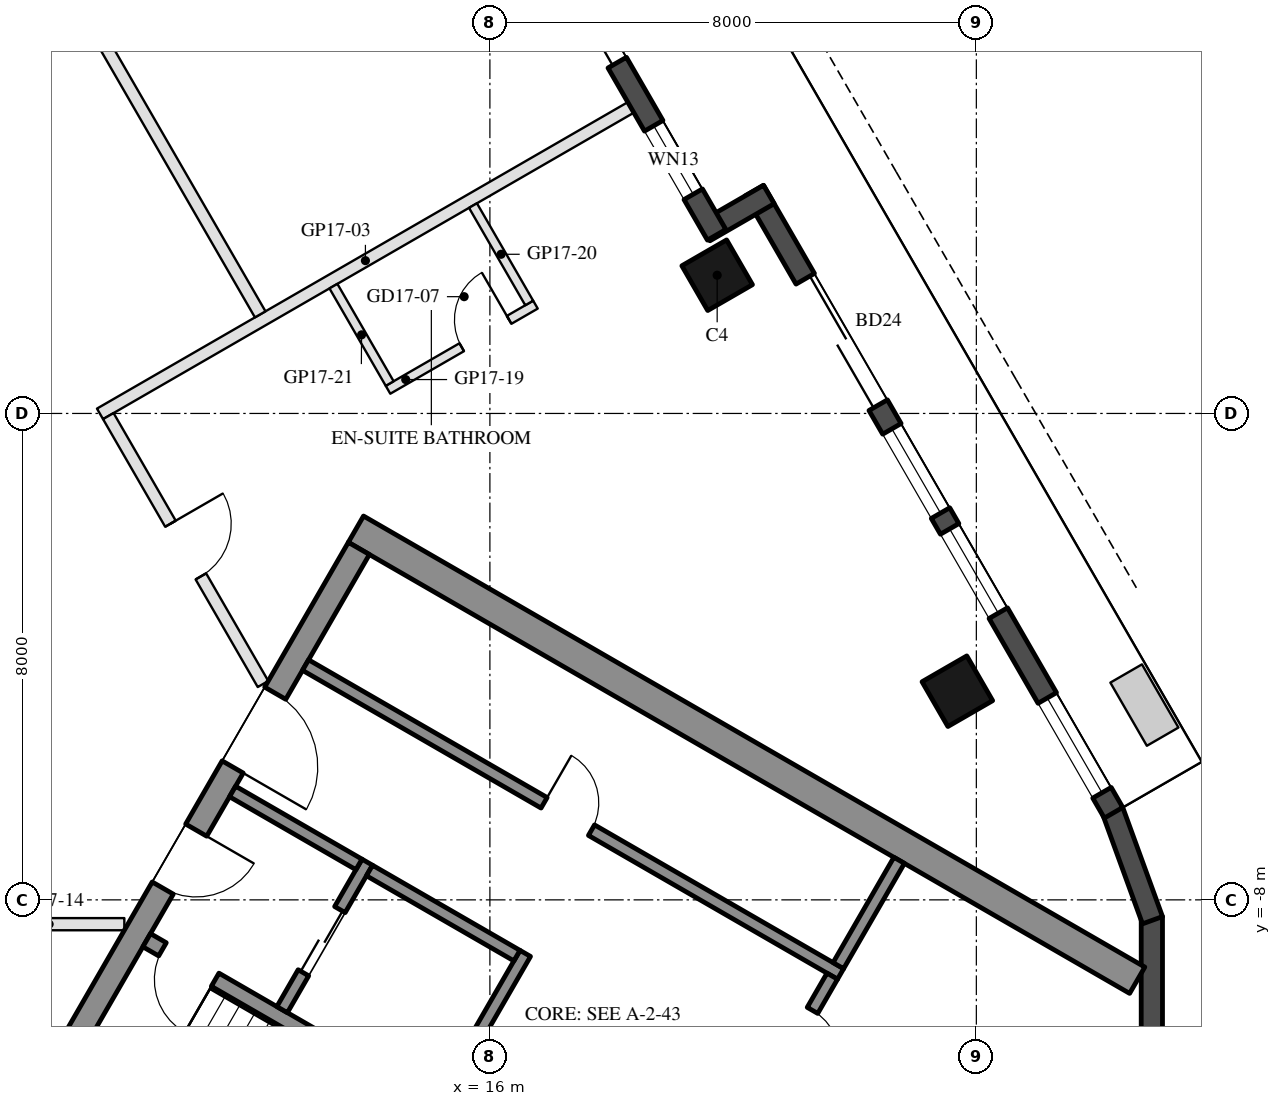
"""IFC4 building model, lengths in metres.
Left out: names, types, materials, properties, quantities, classifications, styles, units other than length and angle.
Written with IfcOpenShell. Run it as: python <this file> out.ifc"""

import sys

from ifc_helpers import new_model, si_unit, direction, frame, frame_2d, origin, origin_2d, place, context, subcontext, project, spatial, rectangle, hollow_rectangle, extrude, element, fill, save


model = new_model("IFC4")
c1 = context("Model", 3, precision=1e-05, world=origin(), true_north=direction((0.0, 1.0)))
c2 = subcontext(c1, "Body", "Model", "MODEL_VIEW")
j1 = project(units=[si_unit("LENGTHUNIT", "METRE"), si_unit("PLANEANGLEUNIT", "RADIAN")], contexts=[c1])
p1 = place(None, origin())
s1 = spatial("IfcSite", under=j1, at=p1, CompositionType="ELEMENT")
p2 = place(p1, origin())
s2 = spatial("IfcBuilding", under=s1, at=p2, CompositionType="ELEMENT")
p3 = place(p2, frame((0.0, 0.0, 183.6)))
s3 = spatial("IfcBuildingStorey", under=s2, at=p3, CompositionType="ELEMENT", Elevation=183.6)
for number, where, z_axis, x_axis in (
    (1, (23.688, -4.568, 0.0), (0.0, 0.0, 1.0), (-0.5, 0.866, 0.0)),
    (2, (19.738, 2.273, 0.0), (0.0, 0.0, 1.0), (-0.5, 0.866, 0.0)),
):
    element("IfcColumn", number, at=place(p3, frame(where, z_axis=z_axis, x_axis=x_axis)), inside=s3, PredefinedType="COLUMN", context=c2, shape_type="SweptSolid", body=[
        extrude(hollow_rectangle(XDim=0.85, YDim=0.85, WallThickness=0.04, at=origin_2d()), origin(), (0.0, 0.0, 1.0), 3.7),
    ])
for number, where, z_axis, x_axis in (
    (3, (26.244, -11.92, 0.0), (0.0, 0.0, 1.0), (0.342, 0.94, 0.0)),
    (4, (26.886, -10.185, 0.0), (0.0, 0.0, 1.0), (0.0, 1.0, 0.0)),
    (5, (26.897, -8.335, 0.0), (0.0, 0.0, 1.0), (-0.342, 0.94, 0.0)),
):
    element("IfcWall", number, at=place(p3, frame(where, z_axis=z_axis, x_axis=x_axis)), inside=s3, PredefinedType="SOLIDWALL", context=c2, shape_type="SweptSolid", body=[
        extrude(rectangle(XDim=1.91, YDim=0.35, at=frame_2d((0.955, 0.0))), origin(), (0.0, 0.0, 1.0), 3.55),
    ])
p4 = place(p3, frame((26.257, -6.567, 0.0), z_axis=(0.0, 0.0, 1.0), x_axis=(-0.500023526245, 0.866011820475, 0.0)))
e6 = element("IfcWall", 6, at=p4, inside=s3, PredefinedType="SOLIDWALL", context=c2, shape_type="SweptSolid", body=[
    extrude(rectangle(XDim=11.816, YDim=0.35, at=frame_2d((5.908, 0.0))), origin(), (0.0, 0.0, 1.0), 3.55),
])
p5 = place(p4, frame((0.38, 0.0, 0.3)))
e7 = element("IfcOpeningElement", 7, at=p5, cuts=e6, PredefinedType="OPENING", context=c2, shape_type="SweptSolid", body=[
    extrude(rectangle(XDim=1.8, YDim=2.65, at=frame_2d((0.9, 1.325))), frame((0.0, 0.185, 0.0), z_axis=(0.0, -1.0, 0.0), x_axis=(1.0, 0.0, 0.0)), (0.0, 0.0, 1.0), 0.37),
])
p6 = place(p4, frame((7.741, 0.0, 0.0)))
e8 = element("IfcOpeningElement", 8, at=p6, cuts=e6, PredefinedType="OPENING", context=c2, shape_type="SweptSolid", body=[
    extrude(rectangle(XDim=2.4, YDim=2.4, at=frame_2d((1.2, 1.2))), frame((0.0, 0.185, 0.0), z_axis=(0.0, -1.0, 0.0), x_axis=(1.0, 0.0, 0.0)), (0.0, 0.0, 1.0), 0.37),
])
p7 = place(p4, frame((3.791, 0.0, 0.3)))
e9 = element("IfcOpeningElement", 9, at=p7, cuts=e6, PredefinedType="OPENING", context=c2, shape_type="SweptSolid", body=[
    extrude(rectangle(XDim=1.6, YDim=2.65, at=frame_2d((0.8, 1.325))), frame((0.0, 0.185, 0.0), z_axis=(0.0, -1.0, 0.0), x_axis=(1.0, 0.0, 0.0)), (0.0, 0.0, 1.0), 0.37),
])
p8 = place(p4, frame((5.691, 0.0, 0.3)))
e10 = element("IfcOpeningElement", 10, at=p8, cuts=e6, PredefinedType="OPENING", context=c2, shape_type="SweptSolid", body=[
    extrude(rectangle(XDim=1.6, YDim=2.65, at=frame_2d((0.8, 1.325))), frame((0.0, 0.185, 0.0), z_axis=(0.0, -1.0, 0.0), x_axis=(1.0, 0.0, 0.0)), (0.0, 0.0, 1.0), 0.37),
])
p9 = place(p3, frame((20.588, 3.601, 0.0), z_axis=(0.0, 0.0, 1.0), x_axis=(-0.866005645448, -0.500034220881, 0.0)))
e11 = element("IfcWall", 11, at=p9, inside=s3, PredefinedType="SOLIDWALL", context=c2, shape_type="SweptSolid", body=[
    extrude(rectangle(XDim=1.22, YDim=0.35, at=frame_2d((0.61, 0.0))), origin(), (0.0, 0.0, 1.0), 3.55),
])
p10 = place(p3, frame((19.729, 2.938, 0.0), z_axis=(0.0, 0.0, 1.0), x_axis=(-0.499976430342, 0.866039011305, 0.0)))
e12 = element("IfcWall", 12, at=p10, inside=s3, PredefinedType="SOLIDWALL", context=c2, shape_type="SweptSolid", body=[
    extrude(rectangle(XDim=6.74, YDim=0.35, at=frame_2d((3.37, 0.0))), origin(), (0.0, 0.0, 1.0), 3.55),
])
p11 = place(p10, frame((0.77, 0.0, 0.3)))
e13 = element("IfcOpeningElement", 13, at=p11, cuts=e12, PredefinedType="OPENING", context=c2, shape_type="SweptSolid", body=[
    extrude(rectangle(XDim=1.3, YDim=2.65, at=frame_2d((0.65, 1.325))), frame((0.0, 0.185, 0.0), z_axis=(0.0, -1.0, 0.0), x_axis=(1.0, 0.0, 0.0)), (0.0, 0.0, 1.0), 0.37),
])
p12 = place(p10, frame((3.27, 0.0, 0.0)))
e14 = element("IfcOpeningElement", 14, at=p12, cuts=e12, PredefinedType="OPENING", context=c2, shape_type="SweptSolid", body=[
    extrude(rectangle(XDim=2.4, YDim=2.4, at=frame_2d((1.2, 1.2))), frame((0.0, 0.185, 0.0), z_axis=(0.0, -1.0, 0.0), x_axis=(1.0, 0.0, 0.0)), (0.0, 0.0, 1.0), 0.37),
])
p13 = place(p3, frame((13.797, -1.903, 0.0), z_axis=(0.0, 0.0, 1.0), x_axis=(0.866025009528, -0.500000682871, 0.0)))
e15 = element("IfcWall", 15, at=p13, inside=s3, PredefinedType="SHEAR", context=c2, shape_type="SweptSolid", body=[
    extrude(rectangle(XDim=14.837, YDim=0.5, at=frame_2d((7.418, 0.0))), origin(), (0.0, 0.0, 1.0), 3.5),
])
p14 = place(p3, frame((8.845, -10.88, 0.0), z_axis=(0.0, 0.0, 1.0), x_axis=(0.500004234368, 0.866022959057, 0.0)))
e16 = element("IfcWall", 16, at=p14, inside=s3, PredefinedType="SHEAR", context=c2, shape_type="SweptSolid", body=[
    extrude(rectangle(XDim=10.0, YDim=0.4, at=frame_2d((5.0, 0.0))), origin(), (0.0, 0.0, 1.0), 3.5),
])
p15 = place(p14, frame((3.55, 0.0, 0.0)))
e17 = element("IfcOpeningElement", 17, at=p15, cuts=e16, PredefinedType="OPENING", context=c2, shape_type="SweptSolid", body=[
    extrude(rectangle(XDim=1.1, YDim=2.1, at=frame_2d((0.55, 1.05))), frame((0.0, 0.21, 0.0), z_axis=(0.0, -1.0, 0.0), x_axis=(1.0, 0.0, 0.0)), (0.0, 0.0, 1.0), 0.42),
])
p16 = place(p14, frame((5.85, 0.0, 0.0)))
e18 = element("IfcOpeningElement", 18, at=p16, cuts=e16, PredefinedType="OPENING", context=c2, shape_type="SweptSolid", body=[
    extrude(rectangle(XDim=1.4, YDim=2.1, at=frame_2d((0.7, 1.05))), frame((0.0, 0.21, 0.0), z_axis=(0.0, -1.0, 0.0), x_axis=(1.0, 0.0, 0.0)), (0.0, 0.0, 1.0), 0.42),
])
p17 = place(p3, frame((10.356, -8.664, 0.0), z_axis=(0.0, 0.0, 1.0), x_axis=(0.866028629588, -0.499994412703, 0.0)))
e19 = element("IfcWall", 19, at=p17, inside=s3, PredefinedType="SHEAR", context=c2, shape_type="SweptSolid", body=[
    extrude(rectangle(XDim=6.45, YDim=0.25, at=frame_2d((3.225, 0.0))), origin(), (0.0, 0.0, 1.0), 3.5),
])
p18 = place(p17, frame((0.3, 0.0, 0.0)))
e20 = element("IfcOpeningElement", 20, at=p18, cuts=e19, PredefinedType="OPENING", context=c2, shape_type="SweptSolid", body=[
    extrude(rectangle(XDim=1.0, YDim=2.1, at=frame_2d((0.5, 1.05))), frame((0.0, 0.135, 0.0), z_axis=(0.0, -1.0, 0.0), x_axis=(1.0, 0.0, 0.0)), (0.0, 0.0, 1.0), 0.27),
])
p19 = place(p3, frame((15.181, -11.305, 0.0), z_axis=(0.0, 0.0, 1.0), x_axis=(0.49994636267, 0.866056369097, 0.0)))
e21 = element("IfcWall", 21, at=p19, inside=s3, PredefinedType="SHEAR", context=c2, shape_type="SweptSolid", body=[
    extrude(rectangle(XDim=2.8, YDim=0.2, at=frame_2d((1.4, 0.0))), origin(), (0.0, 0.0, 1.0), 3.5),
])
p20 = place(p3, frame((12.583, -9.805, 0.0), z_axis=(0.0, 0.0, 1.0), x_axis=(0.49994636267, 0.866056369097, 0.0)))
e22 = element("IfcWall", 22, at=p20, inside=s3, PredefinedType="SHEAR", context=c2, shape_type="SweptSolid", body=[
    extrude(rectangle(XDim=2.8, YDim=0.2, at=frame_2d((1.4, 0.0))), origin(), (0.0, 0.0, 1.0), 3.5),
])
p21 = place(p20, frame((0.7, 0.0, 0.0)))
e23 = element("IfcOpeningElement", 23, at=p21, cuts=e22, PredefinedType="OPENING", context=c2, shape_type="SweptSolid", body=[
    extrude(rectangle(XDim=1.2, YDim=2.1, at=frame_2d((0.6, 1.05))), frame((0.0, 0.11, 0.0), z_axis=(0.0, -1.0, 0.0), x_axis=(1.0, 0.0, 0.0)), (0.0, 0.0, 1.0), 0.22),
])
p22 = place(p3, frame((11.768, -6.217, 0.0), z_axis=(0.0, 0.0, 1.0), x_axis=(0.866050077142, -0.499957262057, 0.0)))
e24 = element("IfcWall", 24, at=p22, inside=s3, PredefinedType="SHEAR", context=c2, shape_type="SweptSolid", body=[
    extrude(rectangle(XDim=2.4, YDim=0.2, at=frame_2d((1.2, 0.0))), origin(), (0.0, 0.0, 1.0), 3.5),
])
p23 = place(p3, frame((14.02, -7.517, 0.0), z_axis=(0.0, 0.0, 1.0), x_axis=(0.866034573852, -0.49998411664, 0.0)))
e25 = element("IfcWall", 25, at=p23, inside=s3, PredefinedType="SHEAR", context=c2, shape_type="SweptSolid", body=[
    extrude(rectangle(XDim=2.8, YDim=0.2, at=frame_2d((1.4, 0.0))), origin(), (0.0, 0.0, 1.0), 3.5),
])
p24 = place(p3, frame((12.968, -4.138, 0.0), z_axis=(0.0, 0.0, 1.0), x_axis=(0.866028328073, -0.49999493495, 0.0)))
e26 = element("IfcWall", 26, at=p24, inside=s3, PredefinedType="SHEAR", context=c2, shape_type="SweptSolid", body=[
    extrude(rectangle(XDim=10.16, YDim=0.2, at=frame_2d((5.08, 0.0))), origin(), (0.0, 0.0, 1.0), 3.5),
])
p25 = place(p24, frame((4.53, 0.0, 0.0)))
e27 = element("IfcOpeningElement", 27, at=p25, cuts=e26, PredefinedType="OPENING", context=c2, shape_type="SweptSolid", body=[
    extrude(rectangle(XDim=0.9, YDim=2.1, at=frame_2d((0.45, 1.05))), frame((0.0, 0.11, 0.0), z_axis=(0.0, -1.0, 0.0), x_axis=(1.0, 0.0, 0.0)), (0.0, 0.0, 1.0), 0.22),
])
p26 = place(p3, frame((20.43, -11.333, 0.0), z_axis=(0.0, 0.0, 1.0), x_axis=(0.500001309137, 0.866024647952, 0.0)))
e28 = element("IfcWall", 28, at=p26, inside=s3, PredefinedType="SHEAR", context=c2, shape_type="SweptSolid", body=[
    extrude(rectangle(XDim=2.4, YDim=0.2, at=frame_2d((1.2, 0.0))), origin(), (0.0, 0.0, 1.0), 3.5),
])
p27 = place(p26, frame((0.85, 0.0, 0.0)))
e29 = element("IfcOpeningElement", 29, at=p27, cuts=e28, PredefinedType="OPENING", context=c2, shape_type="SweptSolid", body=[
    extrude(rectangle(XDim=0.9, YDim=2.1, at=frame_2d((0.45, 1.05))), frame((0.0, 0.11, 0.0), z_axis=(0.0, -1.0, 0.0), x_axis=(1.0, 0.0, 0.0)), (0.0, 0.0, 1.0), 0.22),
])
p28 = place(p3, frame((21.73, -9.082, 0.0), z_axis=(0.0, 0.0, 1.0), x_axis=(0.50002537861, 0.866010750942, 0.0)))
e30 = element("IfcWall", 30, at=p28, inside=s3, PredefinedType="SHEAR", context=c2, shape_type="SweptSolid", body=[
    extrude(rectangle(XDim=2.0, YDim=0.2, at=frame_2d((1.0, 0.0))), origin(), (0.0, 0.0, 1.0), 3.5),
])
p29 = place(p3, frame((18.318, 5.033, 0.0), z_axis=(0.0, 0.0, 1.0), x_axis=(-0.866028692387, -0.49999430393, 0.0)))
e31 = element("IfcWall", 31, at=p29, inside=s3, PredefinedType="PARTITIONING", context=c2, shape_type="SweptSolid", body=[
    extrude(rectangle(XDim=10.08, YDim=0.2, at=frame_2d((5.04, 0.0))), origin(), (0.0, 0.0, 1.0), 3.06),
])
p30 = place(p3, frame((9.988, -8.4, 0.0), z_axis=(0.0, 0.0, 1.0), x_axis=(-1.0, 0.0, 0.0)))
e32 = element("IfcWall", 32, at=p30, inside=s3, PredefinedType="PARTITIONING", context=c2, shape_type="SweptSolid", body=[
    extrude(rectangle(XDim=6.185, YDim=0.2, at=frame_2d((3.092, 0.0))), origin(), (0.0, 0.0, 1.0), 2.95),
])
p31 = place(p30, frame((2.592, 0.0, 0.0)))
e33 = element("IfcOpeningElement", 33, at=p31, cuts=e32, PredefinedType="OPENING", context=c2, shape_type="SweptSolid", body=[
    extrude(rectangle(XDim=1.0, YDim=2.1, at=frame_2d((0.5, 1.05))), frame((0.0, 0.11, 0.0), z_axis=(0.0, -1.0, 0.0), x_axis=(1.0, 0.0, 0.0)), (0.0, 0.0, 1.0), 0.22),
])
p32 = place(p3, frame((9.725, -0.043, 0.0), z_axis=(0.0, 0.0, 1.0), x_axis=(0.500014573982, -0.866016989329, 0.0)))
e34 = element("IfcWall", 34, at=p32, inside=s3, PredefinedType="PARTITIONING", context=c2, shape_type="SweptSolid", body=[
    extrude(rectangle(XDim=5.088, YDim=0.2, at=frame_2d((2.544, 0.0))), origin(), (0.0, 0.0, 1.0), 2.95),
])
p33 = place(p32, frame((2.044, 0.0, 0.0)))
e35 = element("IfcOpeningElement", 35, at=p33, cuts=e34, PredefinedType="OPENING", context=c2, shape_type="SweptSolid", body=[
    extrude(rectangle(XDim=1.0, YDim=2.1, at=frame_2d((0.5, 1.05))), frame((0.0, 0.11, 0.0), z_axis=(0.0, -1.0, 0.0), x_axis=(1.0, 0.0, 0.0)), (0.0, 0.0, 1.0), 0.22),
])
p34 = place(p3, frame((14.324, 0.389, 0.0), z_axis=(0.0, 0.0, 1.0), x_axis=(0.866034573852, 0.49998411664, 0.0)))
e36 = element("IfcWall", 36, at=p34, inside=s3, PredefinedType="PARTITIONING", context=c2, shape_type="SweptSolid", body=[
    extrude(rectangle(XDim=2.8, YDim=0.15, at=frame_2d((1.4, 0.0))), origin(), (0.0, 0.0, 1.0), 3.55),
])
p35 = place(p34, frame((1.4, 0.0, 0.0)))
e37 = element("IfcOpeningElement", 37, at=p35, cuts=e36, PredefinedType="OPENING", context=c2, shape_type="SweptSolid", body=[
    extrude(rectangle(XDim=0.9, YDim=2.1, at=frame_2d((0.45, 1.05))), frame((0.0, 0.085, 0.0), z_axis=(0.0, -1.0, 0.0), x_axis=(1.0, 0.0, 0.0)), (0.0, 0.0, 1.0), 0.17),
])
p36 = place(p3, frame((16.647, 1.817, 0.0), z_axis=(0.0, 0.0, 1.0), x_axis=(-0.500042316284, 0.866000971088, 0.0)))
e38 = element("IfcWall", 38, at=p36, inside=s3, PredefinedType="PARTITIONING", context=c2, shape_type="SweptSolid", body=[
    extrude(rectangle(XDim=1.85, YDim=0.15, at=frame_2d((0.925, 0.0))), origin(), (0.0, 0.0, 1.0), 3.55),
])
p37 = place(p3, frame((14.352, 0.492, 0.0), z_axis=(0.0, 0.0, 1.0), x_axis=(-0.499886193382, 0.866091100096, 0.0)))
e39 = element("IfcWall", 39, at=p37, inside=s3, PredefinedType="PARTITIONING", context=c2, shape_type="SweptSolid", body=[
    extrude(rectangle(XDim=1.85, YDim=0.15, at=frame_2d((0.925, 0.0))), origin(), (0.0, 0.0, 1.0), 3.55),
])
p38 = place(p3, frame((6.973, 10.723, 0.0), z_axis=(0.0, 0.0, 1.0), x_axis=(0.500000207062, -0.866025284237, 0.0)))
e40 = element("IfcWall", 40, at=p38, inside=s3, PredefinedType="PARTITIONING", context=c2, shape_type="SweptSolid", body=[
    extrude(rectangle(XDim=10.5, YDim=0.2, at=frame_2d((5.25, 0.0))), origin(), (0.0, 0.0, 1.0), 2.95),
])
p39 = place(p38, frame((2.45, 0.0, 0.0)))
e41 = element("IfcOpeningElement", 41, at=p39, cuts=e40, PredefinedType="OPENING", context=c2, shape_type="SweptSolid", body=[
    extrude(rectangle(XDim=1.0, YDim=2.1, at=frame_2d((0.5, 1.05))), frame((0.0, 0.11, 0.0), z_axis=(0.0, -1.0, 0.0), x_axis=(1.0, 0.0, 0.0)), (0.0, 0.0, 1.0), 0.22),
])
p40 = place(p5, origin())
e42 = element("IfcWindow", 42, at=p40, inside=s3, PartitioningType="SINGLE_PANEL", PredefinedType="WINDOW", context=c2, shape_type="SweptSolid", body=[
    extrude(rectangle(XDim=1.8, YDim=2.65, at=frame_2d((0.9, 1.325))), frame((0.0, 0.03, 0.0), z_axis=(0.0, -1.0, 0.0), x_axis=(1.0, 0.0, 0.0)), (0.0, 0.0, 1.0), 0.06),
])
fill(e7, e42)
p41 = place(p6, frame((2.4, 0.0, 0.0), z_axis=(0.0, 0.0, 1.0), x_axis=(-1.0, 0.0, 0.0)))
e43 = element("IfcDoor", 43, at=p41, inside=s3, OperationType="SLIDING_TO_LEFT", PredefinedType="DOOR", context=c2, shape_type="SweptSolid", body=[
    extrude(rectangle(XDim=2.4, YDim=2.4, at=frame_2d((1.2, 1.2))), frame((0.0, 0.025, 0.0), z_axis=(0.0, -1.0, 0.0), x_axis=(1.0, 0.0, 0.0)), (0.0, 0.0, 1.0), 0.05),
])
fill(e8, e43)
p42 = place(p7, origin())
e44 = element("IfcWindow", 44, at=p42, inside=s3, PartitioningType="SINGLE_PANEL", PredefinedType="WINDOW", context=c2, shape_type="SweptSolid", body=[
    extrude(rectangle(XDim=1.6, YDim=2.65, at=frame_2d((0.8, 1.325))), frame((0.0, 0.03, 0.0), z_axis=(0.0, -1.0, 0.0), x_axis=(1.0, 0.0, 0.0)), (0.0, 0.0, 1.0), 0.06),
])
fill(e9, e44)
p43 = place(p8, origin())
e45 = element("IfcWindow", 45, at=p43, inside=s3, PartitioningType="SINGLE_PANEL", PredefinedType="WINDOW", context=c2, shape_type="SweptSolid", body=[
    extrude(rectangle(XDim=1.6, YDim=2.65, at=frame_2d((0.8, 1.325))), frame((0.0, 0.03, 0.0), z_axis=(0.0, -1.0, 0.0), x_axis=(1.0, 0.0, 0.0)), (0.0, 0.0, 1.0), 0.06),
])
fill(e10, e45)
p44 = place(p11, origin())
e46 = element("IfcWindow", 46, at=p44, inside=s3, PartitioningType="SINGLE_PANEL", PredefinedType="WINDOW", context=c2, shape_type="SweptSolid", body=[
    extrude(rectangle(XDim=1.3, YDim=2.65, at=frame_2d((0.65, 1.325))), frame((0.0, 0.03, 0.0), z_axis=(0.0, -1.0, 0.0), x_axis=(1.0, 0.0, 0.0)), (0.0, 0.0, 1.0), 0.06),
])
fill(e13, e46)
p45 = place(p12, frame((2.4, 0.0, 0.0), z_axis=(0.0, 0.0, 1.0), x_axis=(-1.0, 0.0, 0.0)))
e47 = element("IfcDoor", 47, at=p45, inside=s3, OperationType="SLIDING_TO_LEFT", PredefinedType="DOOR", context=c2, shape_type="SweptSolid", body=[
    extrude(rectangle(XDim=2.4, YDim=2.4, at=frame_2d((1.2, 1.2))), frame((0.0, 0.025, 0.0), z_axis=(0.0, -1.0, 0.0), x_axis=(1.0, 0.0, 0.0)), (0.0, 0.0, 1.0), 0.05),
])
fill(e14, e47)
p46 = place(p21, origin())
e48 = element("IfcDoor", 48, at=p46, inside=s3, OperationType="DOUBLE_DOOR_SLIDING", PredefinedType="DOOR", context=c2, shape_type="SweptSolid", body=[
    extrude(rectangle(XDim=1.2, YDim=2.1, at=frame_2d((0.6, 1.05))), frame((0.0, 0.025, 0.0), z_axis=(0.0, -1.0, 0.0), x_axis=(1.0, 0.0, 0.0)), (0.0, 0.0, 1.0), 0.05),
])
fill(e23, e48)
p47 = place(p25, origin())
e49 = element("IfcDoor", 49, at=p47, inside=s3, OperationType="SINGLE_SWING_LEFT", PredefinedType="DOOR", context=c2, shape_type="SweptSolid", body=[
    extrude(rectangle(XDim=0.9, YDim=2.1, at=frame_2d((0.45, 1.05))), frame((0.0, 0.025, 0.0), z_axis=(0.0, -1.0, 0.0), x_axis=(1.0, 0.0, 0.0)), (0.0, 0.0, 1.0), 0.05),
])
fill(e27, e49)
p48 = place(p27, frame((0.9, 0.0, 0.0), z_axis=(0.0, 0.0, 1.0), x_axis=(-1.0, 0.0, 0.0)))
e50 = element("IfcDoor", 50, at=p48, inside=s3, OperationType="SINGLE_SWING_RIGHT", PredefinedType="DOOR", context=c2, shape_type="SweptSolid", body=[
    extrude(rectangle(XDim=0.9, YDim=2.1, at=frame_2d((0.45, 1.05))), frame((0.0, 0.025, 0.0), z_axis=(0.0, -1.0, 0.0), x_axis=(1.0, 0.0, 0.0)), (0.0, 0.0, 1.0), 0.05),
])
fill(e29, e50)
p49 = place(p15, frame((1.1, 0.0, 0.0), z_axis=(0.0, 0.0, 1.0), x_axis=(-1.0, 0.0, 0.0)))
e51 = element("IfcDoor", 51, at=p49, inside=s3, OperationType="SINGLE_SWING_LEFT", PredefinedType="DOOR", context=c2, shape_type="SweptSolid", body=[
    extrude(rectangle(XDim=1.1, YDim=2.1, at=frame_2d((0.55, 1.05))), frame((0.0, 0.025, 0.0), z_axis=(0.0, -1.0, 0.0), x_axis=(1.0, 0.0, 0.0)), (0.0, 0.0, 1.0), 0.05),
])
fill(e17, e51)
p50 = place(p16, frame((1.4, 0.0, 0.0), z_axis=(0.0, 0.0, 1.0), x_axis=(-1.0, 0.0, 0.0)))
e52 = element("IfcDoor", 52, at=p50, inside=s3, OperationType="DOUBLE_DOOR_SINGLE_SWING", PredefinedType="DOOR", context=c2, shape_type="SweptSolid", body=[
    extrude(rectangle(XDim=1.4, YDim=2.1, at=frame_2d((0.7, 1.05))), frame((0.0, 0.025, 0.0), z_axis=(0.0, -1.0, 0.0), x_axis=(1.0, 0.0, 0.0)), (0.0, 0.0, 1.0), 0.05),
])
fill(e18, e52)
p51 = place(p18, frame((1.0, 0.0, 0.0), z_axis=(0.0, 0.0, 1.0), x_axis=(-1.0, 0.0, 0.0)))
e53 = element("IfcDoor", 53, at=p51, inside=s3, OperationType="SINGLE_SWING_LEFT", PredefinedType="DOOR", context=c2, shape_type="SweptSolid", body=[
    extrude(rectangle(XDim=1.0, YDim=2.1, at=frame_2d((0.5, 1.05))), frame((0.0, 0.025, 0.0), z_axis=(0.0, -1.0, 0.0), x_axis=(1.0, 0.0, 0.0)), (0.0, 0.0, 1.0), 0.05),
])
fill(e20, e53)
p52 = place(p35, origin())
e54 = element("IfcDoor", 54, at=p52, inside=s3, OperationType="SINGLE_SWING_RIGHT", PredefinedType="DOOR", context=c2, shape_type="SweptSolid", body=[
    extrude(rectangle(XDim=0.9, YDim=2.1, at=frame_2d((0.45, 1.05))), frame((0.0, 0.025, 0.0), z_axis=(0.0, -1.0, 0.0), x_axis=(1.0, 0.0, 0.0)), (0.0, 0.0, 1.0), 0.05),
])
fill(e37, e54)
p53 = place(p33, origin())
e55 = element("IfcDoor", 55, at=p53, inside=s3, OperationType="SINGLE_SWING_LEFT", PredefinedType="DOOR", context=c2, shape_type="SweptSolid", body=[
    extrude(rectangle(XDim=1.0, YDim=2.1, at=frame_2d((0.5, 1.05))), frame((0.0, 0.025, 0.0), z_axis=(0.0, -1.0, 0.0), x_axis=(1.0, 0.0, 0.0)), (0.0, 0.0, 1.0), 0.05),
])
fill(e35, e55)
save(model, sys.argv[1])
